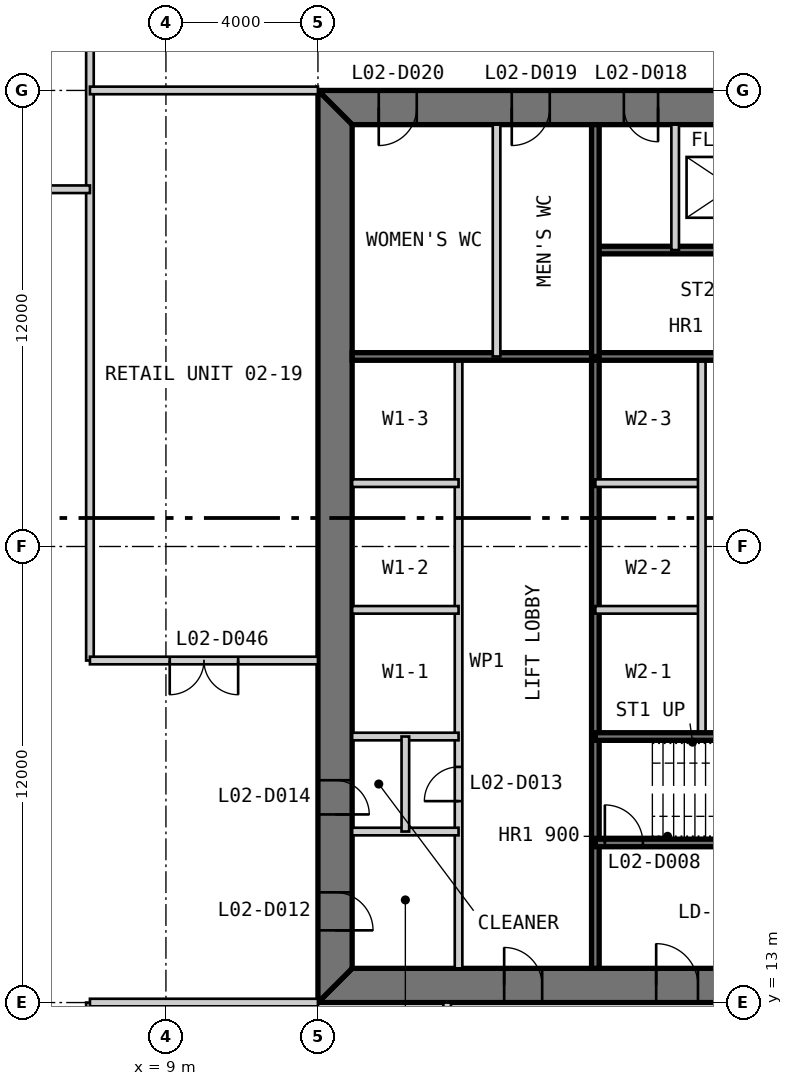
"""IFC4 building model, lengths in metres.
Left out: names, types, materials, properties, quantities, classifications, styles, units other than length and angle.
Written with IfcOpenShell. Run it as: python <this file> out.ifc"""

import sys

from ifc_helpers import new_model, si_unit, direction, frame, frame_2d, origin, place, context, subcontext, project, spatial, polyline, rectangle, outline, extrude, element, fill, save


model = new_model("IFC4")
c1 = context("Model", 3, precision=1e-05, world=origin(), true_north=direction((0.0, 1.0)))
c2 = subcontext(c1, "Body", "Model", "MODEL_VIEW")
j1 = project(units=[si_unit("LENGTHUNIT", "METRE"), si_unit("PLANEANGLEUNIT", "RADIAN")], contexts=[c1])
p1 = place(None, origin())
s1 = spatial("IfcSite", under=j1, at=p1, CompositionType="ELEMENT")
p2 = place(p1, origin())
s2 = spatial("IfcBuilding", under=s1, at=p2, CompositionType="ELEMENT")
p3 = place(p2, frame((0.0, 0.0, 11.8)))
s3 = spatial("IfcBuildingStorey", under=s2, at=p3, CompositionType="ELEMENT", Elevation=11.8)
p4 = place(p3, frame((13.0, 13.45, 0.0), z_axis=(0.0, 0.0, 1.0), x_axis=(1.0, 0.0, 0.0)))
e1 = element("IfcWall", 1, at=p4, inside=s3, PredefinedType="SHEAR", context=c2, shape_type="SweptSolid", body=[
    extrude(outline(polyline([(0.0, -0.45), (24.0, -0.45), (23.1, 0.45), (0.9, 0.45), (0.0, -0.45)])), origin(), (0.0, 0.0, 1.0), 4.8),
])
p5 = place(p4, frame((4.9, 0.0, 0.0)))
e2 = element("IfcOpeningElement", 2, at=p5, cuts=e1, PredefinedType="OPENING", context=c2, shape_type="SweptSolid", body=[
    extrude(rectangle(XDim=1.0, YDim=2.2, at=frame_2d((0.5, 1.1))), frame((0.0, 0.46, 0.0), z_axis=(0.0, -1.0, 0.0), x_axis=(1.0, 0.0, 0.0)), (0.0, 0.0, 1.0), 0.92),
])
p6 = place(p4, frame((8.9, 0.0, 0.0)))
e3 = element("IfcOpeningElement", 3, at=p6, cuts=e1, PredefinedType="OPENING", context=c2, shape_type="SweptSolid", body=[
    extrude(rectangle(XDim=1.1, YDim=2.2, at=frame_2d((0.55, 1.1))), frame((0.0, 0.46, 0.0), z_axis=(0.0, -1.0, 0.0), x_axis=(1.0, 0.0, 0.0)), (0.0, 0.0, 1.0), 0.92),
])
p7 = place(p4, frame((15.05, 0.0, 0.0)))
e4 = element("IfcOpeningElement", 4, at=p7, cuts=e1, PredefinedType="OPENING", context=c2, shape_type="SweptSolid", body=[
    extrude(rectangle(XDim=0.9, YDim=2.2, at=frame_2d((0.45, 1.1))), frame((0.0, 0.46, 0.0), z_axis=(0.0, -1.0, 0.0), x_axis=(1.0, 0.0, 0.0)), (0.0, 0.0, 1.0), 0.92),
])
p8 = place(p4, frame((17.9, 0.0, 0.0)))
e5 = element("IfcOpeningElement", 5, at=p8, cuts=e1, PredefinedType="OPENING", context=c2, shape_type="SweptSolid", body=[
    extrude(rectangle(XDim=1.0, YDim=2.2, at=frame_2d((0.5, 1.1))), frame((0.0, 0.46, 0.0), z_axis=(0.0, -1.0, 0.0), x_axis=(1.0, 0.0, 0.0)), (0.0, 0.0, 1.0), 0.92),
])
p9 = place(p4, frame((21.4, 0.0, 0.0)))
e6 = element("IfcOpeningElement", 6, at=p9, cuts=e1, PredefinedType="OPENING", context=c2, shape_type="SweptSolid", body=[
    extrude(rectangle(XDim=1.0, YDim=2.2, at=frame_2d((0.5, 1.1))), frame((0.0, 0.46, 0.0), z_axis=(0.0, -1.0, 0.0), x_axis=(1.0, 0.0, 0.0)), (0.0, 0.0, 1.0), 0.92),
])
p10 = place(p3, frame((37.0, 36.55, 0.0), z_axis=(0.0, 0.0, 1.0), x_axis=(-1.0, 0.0, 0.0)))
e7 = element("IfcWall", 7, at=p10, inside=s3, PredefinedType="SHEAR", context=c2, shape_type="SweptSolid", body=[
    extrude(outline(polyline([(0.0, -0.45), (24.0, -0.45), (23.1, 0.45), (0.9, 0.45), (0.0, -0.45)])), origin(), (0.0, 0.0, 1.0), 4.8),
])
p11 = place(p10, frame((4.9, 0.0, 0.0)))
e8 = element("IfcOpeningElement", 8, at=p11, cuts=e7, PredefinedType="OPENING", context=c2, shape_type="SweptSolid", body=[
    extrude(rectangle(XDim=1.0, YDim=2.2, at=frame_2d((0.5, 1.1))), frame((0.0, 0.46, 0.0), z_axis=(0.0, -1.0, 0.0), x_axis=(1.0, 0.0, 0.0)), (0.0, 0.0, 1.0), 0.92),
])
p12 = place(p10, frame((8.9, 0.0, 0.0)))
e9 = element("IfcOpeningElement", 9, at=p12, cuts=e7, PredefinedType="OPENING", context=c2, shape_type="SweptSolid", body=[
    extrude(rectangle(XDim=1.1, YDim=2.2, at=frame_2d((0.55, 1.1))), frame((0.0, 0.46, 0.0), z_axis=(0.0, -1.0, 0.0), x_axis=(1.0, 0.0, 0.0)), (0.0, 0.0, 1.0), 0.92),
])
p13 = place(p10, frame((15.05, 0.0, 0.0)))
e10 = element("IfcOpeningElement", 10, at=p13, cuts=e7, PredefinedType="OPENING", context=c2, shape_type="SweptSolid", body=[
    extrude(rectangle(XDim=0.9, YDim=2.2, at=frame_2d((0.45, 1.1))), frame((0.0, 0.46, 0.0), z_axis=(0.0, -1.0, 0.0), x_axis=(1.0, 0.0, 0.0)), (0.0, 0.0, 1.0), 0.92),
])
p14 = place(p10, frame((17.9, 0.0, 0.0)))
e11 = element("IfcOpeningElement", 11, at=p14, cuts=e7, PredefinedType="OPENING", context=c2, shape_type="SweptSolid", body=[
    extrude(rectangle(XDim=1.0, YDim=2.2, at=frame_2d((0.5, 1.1))), frame((0.0, 0.46, 0.0), z_axis=(0.0, -1.0, 0.0), x_axis=(1.0, 0.0, 0.0)), (0.0, 0.0, 1.0), 0.92),
])
p15 = place(p10, frame((21.4, 0.0, 0.0)))
e12 = element("IfcOpeningElement", 12, at=p15, cuts=e7, PredefinedType="OPENING", context=c2, shape_type="SweptSolid", body=[
    extrude(rectangle(XDim=1.0, YDim=2.2, at=frame_2d((0.5, 1.1))), frame((0.0, 0.46, 0.0), z_axis=(0.0, -1.0, 0.0), x_axis=(1.0, 0.0, 0.0)), (0.0, 0.0, 1.0), 0.92),
])
p16 = place(p3, frame((13.45, 36.1, 0.0), z_axis=(0.0, 0.0, 1.0), x_axis=(0.0, -1.0, 0.0)))
e13 = element("IfcWall", 13, at=p16, inside=s3, PredefinedType="SHEAR", context=c2, shape_type="SweptSolid", body=[
    extrude(outline(polyline([(-0.9, -0.45), (23.1, -0.45), (22.2, 0.45), (0.0, 0.45), (-0.9, -0.45)])), origin(), (0.0, 0.0, 1.0), 4.8),
])
p17 = place(p16, frame((20.2, 0.0, 0.0)))
e14 = element("IfcOpeningElement", 14, at=p17, cuts=e13, PredefinedType="OPENING", context=c2, shape_type="SweptSolid", body=[
    extrude(rectangle(XDim=1.0, YDim=2.2, at=frame_2d((0.5, 1.1))), frame((0.0, 0.46, 0.0), z_axis=(0.0, -1.0, 0.0), x_axis=(1.0, 0.0, 0.0)), (0.0, 0.0, 1.0), 0.92),
])
p18 = place(p16, frame((17.25, 0.0, 0.0)))
e15 = element("IfcOpeningElement", 15, at=p18, cuts=e13, PredefinedType="OPENING", context=c2, shape_type="SweptSolid", body=[
    extrude(rectangle(XDim=0.9, YDim=2.2, at=frame_2d((0.45, 1.1))), frame((0.0, 0.46, 0.0), z_axis=(0.0, -1.0, 0.0), x_axis=(1.0, 0.0, 0.0)), (0.0, 0.0, 1.0), 0.92),
])
p19 = place(p3, frame((16.7, 13.9, 0.0), z_axis=(0.0, 0.0, 1.0), x_axis=(0.0, 1.0, 0.0)))
e16 = element("IfcWall", 16, at=p19, inside=s3, PredefinedType="PARTITIONING", context=c2, shape_type="SweptSolid", body=[
    extrude(rectangle(XDim=16.1, YDim=0.2, at=frame_2d((8.05, 0.0))), origin(), (0.0, 0.0, 1.0), 4.6),
])
p20 = place(p19, frame((4.4, 0.0, 0.0)))
e17 = element("IfcOpeningElement", 17, at=p20, cuts=e16, PredefinedType="OPENING", context=c2, shape_type="SweptSolid", body=[
    extrude(rectangle(XDim=0.9, YDim=2.2, at=frame_2d((0.45, 1.1))), frame((0.0, 0.11, 0.0), z_axis=(0.0, -1.0, 0.0), x_axis=(1.0, 0.0, 0.0)), (0.0, 0.0, 1.0), 0.22),
])
p21 = place(p3, frame((20.3, 13.9, 0.0), z_axis=(0.0, 0.0, 1.0), x_axis=(0.0, 1.0, 0.0)))
e18 = element("IfcWall", 18, at=p21, inside=s3, PredefinedType="SOLIDWALL", context=c2, shape_type="SweptSolid", body=[
    extrude(rectangle(XDim=16.1, YDim=0.2, at=frame_2d((8.05, 0.0))), origin(), (0.0, 0.0, 1.0), 4.6),
])
for number, where, z_axis, x_axis in (
    (19, (13.9, 20.0, 0.0), (0.0, 0.0, 1.0), (1.0, 0.0, 0.0)),
    (20, (13.9, 23.333, 0.0), (0.0, 0.0, 1.0), (1.0, 0.0, 0.0)),
    (21, (13.9, 26.667, 0.0), (0.0, 0.0, 1.0), (1.0, 0.0, 0.0)),
    (22, (20.3, 23.333, 0.0), (0.0, 0.0, 1.0), (1.0, 0.0, 0.0)),
    (23, (20.3, 26.667, 0.0), (0.0, 0.0, 1.0), (1.0, 0.0, 0.0)),
):
    element("IfcWall", number, at=place(p3, frame(where, z_axis=z_axis, x_axis=x_axis)), inside=s3, PredefinedType="PARTITIONING", context=c2, shape_type="SweptSolid", body=[
        extrude(rectangle(XDim=2.8, YDim=0.2, at=frame_2d((1.4, 0.0))), origin(), (0.0, 0.0, 1.0), 4.6),
    ])
p22 = place(p3, frame((23.1, 20.0, 0.0), z_axis=(0.0, 0.0, 1.0), x_axis=(0.0, 1.0, 0.0)))
e24 = element("IfcWall", 24, at=p22, inside=s3, PredefinedType="PARTITIONING", context=c2, shape_type="SweptSolid", body=[
    extrude(rectangle(XDim=10.0, YDim=0.2, at=frame_2d((5.0, 0.0))), origin(), (0.0, 0.0, 1.0), 4.6),
])
p23 = place(p3, frame((20.3, 17.2, 0.0), z_axis=(0.0, 0.0, 1.0), x_axis=(1.0, 0.0, 0.0)))
e25 = element("IfcWall", 25, at=p23, inside=s3, PredefinedType="SOLIDWALL", context=c2, shape_type="SweptSolid", body=[
    extrude(rectangle(XDim=9.4, YDim=0.2, at=frame_2d((4.7, 0.0))), origin(), (0.0, 0.0, 1.0), 4.6),
])
p24 = place(p23, frame((0.25, 0.0, 0.0)))
e26 = element("IfcOpeningElement", 26, at=p24, cuts=e25, PredefinedType="OPENING", context=c2, shape_type="SweptSolid", body=[
    extrude(rectangle(XDim=1.0, YDim=2.2, at=frame_2d((0.5, 1.1))), frame((0.0, 0.11, 0.0), z_axis=(0.0, -1.0, 0.0), x_axis=(1.0, 0.0, 0.0)), (0.0, 0.0, 1.0), 0.22),
])
p25 = place(p3, frame((20.3, 20.0, 0.0), z_axis=(0.0, 0.0, 1.0), x_axis=(1.0, 0.0, 0.0)))
e27 = element("IfcWall", 27, at=p25, inside=s3, PredefinedType="SOLIDWALL", context=c2, shape_type="SweptSolid", body=[
    extrude(rectangle(XDim=15.8, YDim=0.2, at=frame_2d((7.9, 0.0))), origin(), (0.0, 0.0, 1.0), 4.6),
])
p26 = place(p3, frame((13.9, 17.5, 0.0), z_axis=(0.0, 0.0, 1.0), x_axis=(1.0, 0.0, 0.0)))
e28 = element("IfcWall", 28, at=p26, inside=s3, PredefinedType="PARTITIONING", context=c2, shape_type="SweptSolid", body=[
    extrude(rectangle(XDim=2.8, YDim=0.2, at=frame_2d((1.4, 0.0))), origin(), (0.0, 0.0, 1.0), 4.6),
])
p27 = place(p3, frame((15.3, 17.5, 0.0), z_axis=(0.0, 0.0, 1.0), x_axis=(0.0, 1.0, 0.0)))
e29 = element("IfcWall", 29, at=p27, inside=s3, PredefinedType="PARTITIONING", context=c2, shape_type="SweptSolid", body=[
    extrude(rectangle(XDim=2.5, YDim=0.2, at=frame_2d((1.25, 0.0))), origin(), (0.0, 0.0, 1.0), 4.6),
])
p28 = place(p3, frame((29.7, 32.8, 0.0), z_axis=(0.0, 0.0, 1.0), x_axis=(-1.0, 0.0, 0.0)))
e30 = element("IfcWall", 30, at=p28, inside=s3, PredefinedType="SOLIDWALL", context=c2, shape_type="SweptSolid", body=[
    extrude(rectangle(XDim=9.4, YDim=0.2, at=frame_2d((4.7, 0.0))), origin(), (0.0, 0.0, 1.0), 4.6),
])
p29 = place(p28, frame((0.25, 0.0, 0.0)))
e31 = element("IfcOpeningElement", 31, at=p29, cuts=e30, PredefinedType="OPENING", context=c2, shape_type="SweptSolid", body=[
    extrude(rectangle(XDim=1.0, YDim=2.2, at=frame_2d((0.5, 1.1))), frame((0.0, 0.11, 0.0), z_axis=(0.0, -1.0, 0.0), x_axis=(1.0, 0.0, 0.0)), (0.0, 0.0, 1.0), 0.22),
])
p30 = place(p3, frame((29.7, 30.0, 0.0), z_axis=(0.0, 0.0, 1.0), x_axis=(-1.0, 0.0, 0.0)))
e32 = element("IfcWall", 32, at=p30, inside=s3, PredefinedType="SOLIDWALL", context=c2, shape_type="SweptSolid", body=[
    extrude(rectangle(XDim=15.8, YDim=0.2, at=frame_2d((7.9, 0.0))), origin(), (0.0, 0.0, 1.0), 4.6),
])
p31 = place(p3, frame((22.4, 36.1, 0.0), z_axis=(0.0, 0.0, 1.0), x_axis=(0.0, -1.0, 0.0)))
e33 = element("IfcWall", 33, at=p31, inside=s3, PredefinedType="PARTITIONING", context=c2, shape_type="SweptSolid", body=[
    extrude(rectangle(XDim=3.3, YDim=0.2, at=frame_2d((1.65, 0.0))), origin(), (0.0, 0.0, 1.0), 4.6),
])
p32 = place(p3, frame((20.3, 36.1, 0.0), z_axis=(0.0, 0.0, 1.0), x_axis=(0.0, -1.0, 0.0)))
e34 = element("IfcWall", 34, at=p32, inside=s3, PredefinedType="SOLIDWALL", context=c2, shape_type="SweptSolid", body=[
    extrude(rectangle(XDim=6.1, YDim=0.2, at=frame_2d((3.05, 0.0))), origin(), (0.0, 0.0, 1.0), 4.6),
])
p33 = place(p3, frame((17.7, 36.1, 0.0), z_axis=(0.0, 0.0, 1.0), x_axis=(0.0, -1.0, 0.0)))
e35 = element("IfcWall", 35, at=p33, inside=s3, PredefinedType="PARTITIONING", context=c2, shape_type="SweptSolid", body=[
    extrude(rectangle(XDim=6.1, YDim=0.2, at=frame_2d((3.05, 0.0))), origin(), (0.0, 0.0, 1.0), 4.6),
])
p34 = place(p3, frame((7.0, 7.0, 0.0), z_axis=(0.0, 0.0, 1.0), x_axis=(0.0, 1.0, 0.0)))
e36 = element("IfcWall", 36, at=p34, inside=s3, PredefinedType="PARTITIONING", context=c2, shape_type="SweptSolid", body=[
    extrude(rectangle(XDim=6.0, YDim=0.2, at=frame_2d((3.0, 0.0))), origin(), (0.0, 0.0, 1.0), 4.5),
])
p35 = place(p3, frame((7.0, 22.0, 0.0), z_axis=(0.0, 0.0, 1.0), x_axis=(0.0, 1.0, 0.0)))
e37 = element("IfcWall", 37, at=p35, inside=s3, PredefinedType="PARTITIONING", context=c2, shape_type="SweptSolid", body=[
    extrude(rectangle(XDim=21.0, YDim=0.2, at=frame_2d((10.5, 0.0))), origin(), (0.0, 0.0, 1.0), 3.843),
])
p36 = place(p3, frame((16.4, 7.0, 0.0), z_axis=(0.0, 0.0, 1.0), x_axis=(0.0, 1.0, 0.0)))
e38 = element("IfcWall", 38, at=p36, inside=s3, PredefinedType="PARTITIONING", context=c2, shape_type="SweptSolid", body=[
    extrude(rectangle(XDim=6.0, YDim=0.2, at=frame_2d((3.0, 0.0))), origin(), (0.0, 0.0, 1.0), 4.5),
])
p37 = place(p3, frame((7.0, 13.0, 0.0), z_axis=(0.0, 0.0, 1.0), x_axis=(1.0, 0.0, 0.0)))
e39 = element("IfcWall", 39, at=p37, inside=s3, PredefinedType="PARTITIONING", context=c2, shape_type="SweptSolid", body=[
    extrude(rectangle(XDim=6.0, YDim=0.2, at=frame_2d((3.0, 0.0))), origin(), (0.0, 0.0, 1.0), 3.653),
])
p38 = place(p3, frame((7.0, 22.0, 0.0), z_axis=(0.0, 0.0, 1.0), x_axis=(1.0, 0.0, 0.0)))
e40 = element("IfcWall", 40, at=p38, inside=s3, PredefinedType="PARTITIONING", context=c2, shape_type="SweptSolid", body=[
    extrude(rectangle(XDim=6.0, YDim=0.2, at=frame_2d((3.0, 0.0))), origin(), (0.0, 0.0, 1.0), 4.5),
])
p39 = place(p38, frame((2.1, 0.0, 0.0)))
e41 = element("IfcOpeningElement", 41, at=p39, cuts=e40, PredefinedType="OPENING", context=c2, shape_type="SweptSolid", body=[
    extrude(rectangle(XDim=1.8, YDim=2.4, at=frame_2d((0.9, 1.2))), frame((0.0, 0.11, 0.0), z_axis=(0.0, -1.0, 0.0), x_axis=(1.0, 0.0, 0.0)), (0.0, 0.0, 1.0), 0.22),
])
p40 = place(p3, frame((-15.25, 34.4, 0.0), z_axis=(0.0, 0.0, 1.0), x_axis=(1.0, 0.0, 0.0)))
e42 = element("IfcWall", 42, at=p40, inside=s3, PredefinedType="PARTITIONING", context=c2, shape_type="SweptSolid", body=[
    extrude(rectangle(XDim=22.25, YDim=0.2, at=frame_2d((11.125, 0.0))), origin(), (0.0, 0.0, 1.0), 4.5),
])
p41 = place(p40, frame((17.525, 0.0, 0.0)))
e43 = element("IfcOpeningElement", 43, at=p41, cuts=e42, PredefinedType="OPENING", context=c2, shape_type="SweptSolid", body=[
    extrude(rectangle(XDim=1.8, YDim=2.4, at=frame_2d((0.9, 1.2))), frame((0.0, 0.11, 0.0), z_axis=(0.0, -1.0, 0.0), x_axis=(1.0, 0.0, 0.0)), (0.0, 0.0, 1.0), 0.22),
])
p42 = place(p40, frame((10.325, 0.0, 0.0)))
e44 = element("IfcOpeningElement", 44, at=p42, cuts=e42, PredefinedType="OPENING", context=c2, shape_type="SweptSolid", body=[
    extrude(rectangle(XDim=1.8, YDim=2.4, at=frame_2d((0.9, 1.2))), frame((0.0, 0.11, 0.0), z_axis=(0.0, -1.0, 0.0), x_axis=(1.0, 0.0, 0.0)), (0.0, 0.0, 1.0), 0.22),
])
p43 = place(p40, frame((3.025, 0.0, 0.0)))
e45 = element("IfcOpeningElement", 45, at=p43, cuts=e42, PredefinedType="OPENING", context=c2, shape_type="SweptSolid", body=[
    extrude(rectangle(XDim=1.8, YDim=2.4, at=frame_2d((0.9, 1.2))), frame((0.0, 0.11, 0.0), z_axis=(0.0, -1.0, 0.0), x_axis=(1.0, 0.0, 0.0)), (0.0, 0.0, 1.0), 0.22),
])
p44 = place(p3, frame((7.0, 37.0, 0.0), z_axis=(0.0, 0.0, 1.0), x_axis=(1.0, 0.0, 0.0)))
e46 = element("IfcWall", 46, at=p44, inside=s3, PredefinedType="PARTITIONING", context=c2, shape_type="SweptSolid", body=[
    extrude(rectangle(XDim=6.0, YDim=0.2, at=frame_2d((3.0, 0.0))), origin(), (0.0, 0.0, 1.0), 3.653),
])
p45 = place(p5, origin())
e47 = element("IfcDoor", 47, at=p45, inside=s3, OperationType="SINGLE_SWING_LEFT", PredefinedType="DOOR", context=c2, shape_type="SweptSolid", body=[
    extrude(rectangle(XDim=1.0, YDim=2.2, at=frame_2d((0.5, 1.1))), frame((0.0, 0.025, 0.0), z_axis=(0.0, -1.0, 0.0), x_axis=(1.0, 0.0, 0.0)), (0.0, 0.0, 1.0), 0.05),
    extrude(outline(polyline([(0.0, 0.0), (0.04, 0.0), (0.04, 2.16), (0.96, 2.16), (0.96, 0.0), (1.0, 0.0), (1.0, 2.2), (0.0, 2.2), (0.0, 0.0)])), frame((0.0, 0.3, 0.0), z_axis=(0.0, -1.0, 0.0), x_axis=(1.0, 0.0, 0.0)), (0.0, 0.0, 1.0), 0.6),
])
fill(e2, e47)
p46 = place(p6, origin())
e48 = element("IfcDoor", 48, at=p46, inside=s3, OperationType="SINGLE_SWING_LEFT", PredefinedType="DOOR", context=c2, shape_type="SweptSolid", body=[
    extrude(rectangle(XDim=1.1, YDim=2.2, at=frame_2d((0.55, 1.1))), frame((0.0, 0.025, 0.0), z_axis=(0.0, -1.0, 0.0), x_axis=(1.0, 0.0, 0.0)), (0.0, 0.0, 1.0), 0.05),
    extrude(outline(polyline([(0.0, 0.0), (0.04, 0.0), (0.04, 2.16), (1.06, 2.16), (1.06, 0.0), (1.1, 0.0), (1.1, 2.2), (0.0, 2.2), (0.0, 0.0)])), frame((0.0, 0.3, 0.0), z_axis=(0.0, -1.0, 0.0), x_axis=(1.0, 0.0, 0.0)), (0.0, 0.0, 1.0), 0.6),
])
fill(e3, e48)
p47 = place(p24, origin())
e49 = element("IfcDoor", 49, at=p47, inside=s3, OperationType="SINGLE_SWING_LEFT", PredefinedType="DOOR", context=c2, shape_type="SweptSolid", body=[
    extrude(rectangle(XDim=1.0, YDim=2.2, at=frame_2d((0.5, 1.1))), frame((0.0, 0.025, 0.0), z_axis=(0.0, -1.0, 0.0), x_axis=(1.0, 0.0, 0.0)), (0.0, 0.0, 1.0), 0.05),
])
fill(e26, e49)
p48 = place(p17, origin())
e50 = element("IfcDoor", 50, at=p48, inside=s3, OperationType="SINGLE_SWING_RIGHT", PredefinedType="DOOR", context=c2, shape_type="SweptSolid", body=[
    extrude(rectangle(XDim=1.0, YDim=2.2, at=frame_2d((0.5, 1.1))), frame((0.0, 0.025, 0.0), z_axis=(0.0, -1.0, 0.0), x_axis=(1.0, 0.0, 0.0)), (0.0, 0.0, 1.0), 0.05),
    extrude(outline(polyline([(0.0, 0.0), (0.04, 0.0), (0.04, 2.16), (0.96, 2.16), (0.96, 0.0), (1.0, 0.0), (1.0, 2.2), (0.0, 2.2), (0.0, 0.0)])), frame((0.0, 0.3, 0.0), z_axis=(0.0, -1.0, 0.0), x_axis=(1.0, 0.0, 0.0)), (0.0, 0.0, 1.0), 0.6),
])
fill(e14, e50)
p49 = place(p20, origin())
e51 = element("IfcDoor", 51, at=p49, inside=s3, OperationType="SINGLE_SWING_LEFT", PredefinedType="DOOR", context=c2, shape_type="SweptSolid", body=[
    extrude(rectangle(XDim=0.9, YDim=2.2, at=frame_2d((0.45, 1.1))), frame((0.0, 0.025, 0.0), z_axis=(0.0, -1.0, 0.0), x_axis=(1.0, 0.0, 0.0)), (0.0, 0.0, 1.0), 0.05),
])
fill(e17, e51)
p50 = place(p18, origin())
e52 = element("IfcDoor", 52, at=p50, inside=s3, OperationType="SINGLE_SWING_RIGHT", PredefinedType="DOOR", context=c2, shape_type="SweptSolid", body=[
    extrude(rectangle(XDim=0.9, YDim=2.2, at=frame_2d((0.45, 1.1))), frame((0.0, 0.025, 0.0), z_axis=(0.0, -1.0, 0.0), x_axis=(1.0, 0.0, 0.0)), (0.0, 0.0, 1.0), 0.05),
    extrude(outline(polyline([(0.0, 0.0), (0.04, 0.0), (0.04, 2.16), (0.86, 2.16), (0.86, 0.0), (0.9, 0.0), (0.9, 2.2), (0.0, 2.2), (0.0, 0.0)])), frame((0.0, 0.3, 0.0), z_axis=(0.0, -1.0, 0.0), x_axis=(1.0, 0.0, 0.0)), (0.0, 0.0, 1.0), 0.6),
])
fill(e15, e52)
p51 = place(p13, origin())
e53 = element("IfcDoor", 53, at=p51, inside=s3, OperationType="SINGLE_SWING_LEFT", PredefinedType="DOOR", context=c2, shape_type="SweptSolid", body=[
    extrude(rectangle(XDim=0.9, YDim=2.2, at=frame_2d((0.45, 1.1))), frame((0.0, 0.025, 0.0), z_axis=(0.0, -1.0, 0.0), x_axis=(1.0, 0.0, 0.0)), (0.0, 0.0, 1.0), 0.05),
    extrude(outline(polyline([(0.0, 0.0), (0.04, 0.0), (0.04, 2.16), (0.86, 2.16), (0.86, 0.0), (0.9, 0.0), (0.9, 2.2), (0.0, 2.2), (0.0, 0.0)])), frame((0.0, 0.3, 0.0), z_axis=(0.0, -1.0, 0.0), x_axis=(1.0, 0.0, 0.0)), (0.0, 0.0, 1.0), 0.6),
])
fill(e10, e53)
p52 = place(p14, origin())
e54 = element("IfcDoor", 54, at=p52, inside=s3, OperationType="SINGLE_SWING_RIGHT", PredefinedType="DOOR", context=c2, shape_type="SweptSolid", body=[
    extrude(rectangle(XDim=1.0, YDim=2.2, at=frame_2d((0.5, 1.1))), frame((0.0, 0.025, 0.0), z_axis=(0.0, -1.0, 0.0), x_axis=(1.0, 0.0, 0.0)), (0.0, 0.0, 1.0), 0.05),
    extrude(outline(polyline([(0.0, 0.0), (0.04, 0.0), (0.04, 2.16), (0.96, 2.16), (0.96, 0.0), (1.0, 0.0), (1.0, 2.2), (0.0, 2.2), (0.0, 0.0)])), frame((0.0, 0.3, 0.0), z_axis=(0.0, -1.0, 0.0), x_axis=(1.0, 0.0, 0.0)), (0.0, 0.0, 1.0), 0.6),
])
fill(e11, e54)
p53 = place(p15, origin())
e55 = element("IfcDoor", 55, at=p53, inside=s3, OperationType="SINGLE_SWING_RIGHT", PredefinedType="DOOR", context=c2, shape_type="SweptSolid", body=[
    extrude(rectangle(XDim=1.0, YDim=2.2, at=frame_2d((0.5, 1.1))), frame((0.0, 0.025, 0.0), z_axis=(0.0, -1.0, 0.0), x_axis=(1.0, 0.0, 0.0)), (0.0, 0.0, 1.0), 0.05),
    extrude(outline(polyline([(0.0, 0.0), (0.04, 0.0), (0.04, 2.16), (0.96, 2.16), (0.96, 0.0), (1.0, 0.0), (1.0, 2.2), (0.0, 2.2), (0.0, 0.0)])), frame((0.0, 0.3, 0.0), z_axis=(0.0, -1.0, 0.0), x_axis=(1.0, 0.0, 0.0)), (0.0, 0.0, 1.0), 0.6),
])
fill(e12, e55)
p54 = place(p39, frame((1.8, 0.0, 0.0), z_axis=(0.0, 0.0, 1.0), x_axis=(-1.0, 0.0, 0.0)))
e56 = element("IfcDoor", 56, at=p54, inside=s3, OperationType="DOUBLE_DOOR_SINGLE_SWING", PredefinedType="DOOR", context=c2, shape_type="SweptSolid", body=[
    extrude(rectangle(XDim=1.8, YDim=2.4, at=frame_2d((0.9, 1.2))), frame((0.0, 0.025, 0.0), z_axis=(0.0, -1.0, 0.0), x_axis=(1.0, 0.0, 0.0)), (0.0, 0.0, 1.0), 0.05),
])
fill(e41, e56)
save(model, sys.argv[1])
